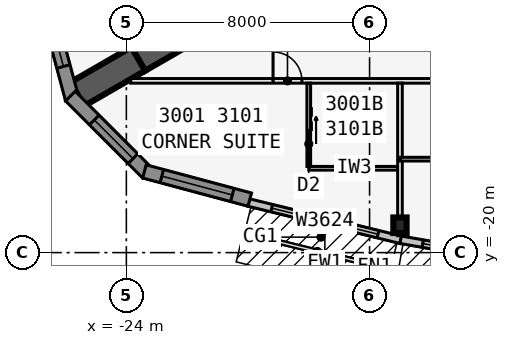
"""IFC4 building model, lengths in metres.
Left out: names, types, materials, properties, quantities, classifications, styles, units other than length and angle.
Written with IfcOpenShell. Run it as: python <this file> out.ifc"""

import sys

from ifc_helpers import new_model, si_unit, direction, frame, frame_2d, origin, origin_2d, place, context, subcontext, project, spatial, polyline, rectangle, i_section, outline, extrude, element, fill, save


model = new_model("IFC4")
c1 = context("Model", 3, precision=1e-05, world=origin(), true_north=direction((0.0, 1.0)))
c2 = subcontext(c1, "Body", "Model", "MODEL_VIEW")
j1 = project(units=[si_unit("LENGTHUNIT", "METRE"), si_unit("PLANEANGLEUNIT", "RADIAN")], contexts=[c1])
p1 = place(None, origin())
s1 = spatial("IfcSite", under=j1, at=p1, CompositionType="ELEMENT")
p2 = place(p1, origin())
s2 = spatial("IfcBuilding", under=s1, at=p2, CompositionType="ELEMENT")
p3 = place(p2, frame((0.0, 0.0, 118.1)))
s3 = spatial("IfcBuildingStorey", under=s2, at=p3, CompositionType="ELEMENT", Elevation=118.1)
for number, where, z_axis, x_axis in (
    (1, (-21.61, -12.477, 0.0), (0.0, 0.0, 1.0), (-0.866, -0.5, 0.0)),
    (2, (-23.61, -13.631, 0.0), (0.0, 0.0, 1.0), (-0.866, -0.5, 0.0)),
):
    element("IfcWall", number, at=place(p3, frame(where, z_axis=z_axis, x_axis=x_axis)), inside=s3, PredefinedType="SHEAR", context=c2, shape_type="SweptSolid", body=[
        extrude(rectangle(XDim=2.309, YDim=0.9, at=frame_2d((1.155, 0.0))), origin(), (0.0, 0.0, 1.0), 3.4),
    ])
p4 = place(p3, frame((-15.0, -19.1, 0.0), z_axis=(0.0, 0.0, 1.0), x_axis=(1.0, 0.0, 0.0)))
e3 = element("IfcColumn", 3, at=p4, inside=s3, PredefinedType="COLUMN", context=c2, shape_type="SweptSolid", body=[
    extrude(i_section(OverallWidth=0.437, OverallDepth=0.513, WebThickness=0.061, FlangeThickness=0.097, at=origin_2d()), origin(), (0.0, 0.0, 1.0), 3.4),
])
p5 = place(p3, frame((-19.97, -18.354, 0.0), z_axis=(0.0, 0.0, 1.0), x_axis=(0.971270024053, -0.237980126011, 0.0)))
e4 = element("IfcWall", 4, at=p5, inside=s3, PredefinedType="STANDARD", context=c2, shape_type="SweptSolid", body=[
    extrude(rectangle(XDim=5.148, YDim=0.25, at=frame_2d((2.574, 0.0))), origin(), (0.0, 0.0, 1.0), 3.235),
])
p6 = place(p5, frame((0.774, 0.0, 0.45)))
e5 = element("IfcOpeningElement", 5, at=p6, cuts=e4, PredefinedType="OPENING", context=c2, shape_type="SweptSolid", body=[
    extrude(rectangle(XDim=3.6, YDim=2.4, at=frame_2d((1.8, 1.2))), frame((0.0, 0.135, 0.0), z_axis=(0.0, -1.0, 0.0), x_axis=(1.0, 0.0, 0.0)), (0.0, 0.0, 1.0), 0.27),
])
p7 = place(p3, frame((-14.979, -19.577, 0.0), z_axis=(0.0, 0.0, 1.0), x_axis=(0.985030467156, -0.172380331752, 0.0)))
e6 = element("IfcWall", 6, at=p7, inside=s3, PredefinedType="STANDARD", context=c2, shape_type="SweptSolid", body=[
    extrude(rectangle(XDim=5.076, YDim=0.25, at=frame_2d((2.538, 0.0))), origin(), (0.0, 0.0, 1.0), 3.235),
])
p8 = place(p7, frame((0.738, 0.0, 0.45)))
e7 = element("IfcOpeningElement", 7, at=p8, cuts=e6, PredefinedType="OPENING", context=c2, shape_type="SweptSolid", body=[
    extrude(rectangle(XDim=3.6, YDim=2.4, at=frame_2d((1.8, 1.2))), frame((0.0, 0.135, 0.0), z_axis=(0.0, -1.0, 0.0), x_axis=(1.0, 0.0, 0.0)), (0.0, 0.0, 1.0), 0.27),
])
p9 = place(p3, frame((-26.711, -11.489, 0.0), z_axis=(0.0, 0.0, 1.0), x_axis=(0.258823421857, -0.965924653531, 0.0)))
e8 = element("IfcWall", 8, at=p9, inside=s3, PredefinedType="SOLIDWALL", context=c2, shape_type="SweptSolid", body=[
    extrude(outline(polyline([(3.586, 0.225), (3.527, 0.225), (3.035, 0.093), (3.0, 0.225), (0.0, 0.225), (0.0, -0.225), (3.586, -0.225), (3.586, 0.225)])), origin(), (0.0, 0.0, 1.0), 3.235),
])
p10 = place(p9, frame((0.675, 0.0, 0.45)))
e9 = element("IfcOpeningElement", 9, at=p10, cuts=e8, PredefinedType="OPENING", context=c2, shape_type="SweptSolid", body=[
    extrude(rectangle(XDim=1.8, YDim=2.4, at=frame_2d((0.9, 1.2))), frame((0.0, 0.235, 0.0), z_axis=(0.0, -1.0, 0.0), x_axis=(1.0, 0.0, 0.0)), (0.0, 0.0, 1.0), 0.47),
])
p11 = place(p3, frame((-25.841, -14.852, 0.0), z_axis=(0.0, 0.0, 1.0), x_axis=(0.707106781187, -0.707106781187, 0.0)))
e10 = element("IfcWall", 10, at=p11, inside=s3, PredefinedType="SOLIDWALL", context=c2, shape_type="SweptSolid", body=[
    extrude(outline(polyline([(3.586, 0.225), (0.586, 0.225), (0.551, 0.093), (0.059, 0.225), (0.0, 0.225), (0.0, -0.225), (3.586, -0.225), (3.586, 0.225)])), origin(), (0.0, 0.0, 1.0), 3.235),
])
p12 = place(p11, frame((1.111, 0.0, 0.45)))
e11 = element("IfcOpeningElement", 11, at=p12, cuts=e10, PredefinedType="OPENING", context=c2, shape_type="SweptSolid", body=[
    extrude(rectangle(XDim=1.8, YDim=2.4, at=frame_2d((0.9, 1.2))), frame((0.0, 0.235, 0.0), z_axis=(0.0, -1.0, 0.0), x_axis=(1.0, 0.0, 0.0)), (0.0, 0.0, 1.0), 0.47),
])
p13 = place(p3, frame((-23.406, -17.33, 0.0), z_axis=(0.0, 0.0, 1.0), x_axis=(0.965924653531, -0.258823421857, 0.0)))
e12 = element("IfcWall", 12, at=p13, inside=s3, PredefinedType="SOLIDWALL", context=c2, shape_type="SweptSolid", body=[
    extrude(rectangle(XDim=3.586, YDim=0.45, at=frame_2d((1.793, 0.0))), origin(), (0.0, 0.0, 1.0), 3.235),
])
p14 = place(p13, frame((0.593, 0.0, 0.45)))
e13 = element("IfcOpeningElement", 13, at=p14, cuts=e12, PredefinedType="OPENING", context=c2, shape_type="SweptSolid", body=[
    extrude(rectangle(XDim=2.4, YDim=2.4, at=frame_2d((1.2, 1.2))), frame((0.0, 0.235, 0.0), z_axis=(0.0, -1.0, 0.0), x_axis=(1.0, 0.0, 0.0)), (0.0, 0.0, 1.0), 0.47),
])
p15 = place(p3, frame((-23.857, -14.351, 0.0), z_axis=(0.0, 0.0, 1.0), x_axis=(1.0, 0.0, 0.0)))
e14 = element("IfcWall", 14, at=p15, inside=s3, PredefinedType="PARTITIONING", context=c2, shape_type="SweptSolid", body=[
    extrude(rectangle(XDim=47.714, YDim=0.15, at=frame_2d((23.857, 0.0))), origin(), (0.0, 0.0, 1.0), 3.235),
])
p16 = place(p15, frame((4.682, 0.0, 0.0)))
e15 = element("IfcOpeningElement", 15, at=p16, cuts=e14, PredefinedType="OPENING", context=c2, shape_type="SweptSolid", body=[
    extrude(rectangle(XDim=0.95, YDim=2.13, at=frame_2d((0.475, 1.065))), frame((0.0, 0.085, 0.0), z_axis=(0.0, -1.0, 0.0), x_axis=(1.0, 0.0, 0.0)), (0.0, 0.0, 1.0), 0.17),
])
p17 = place(p15, frame((11.482, 0.0, 0.0)))
e16 = element("IfcOpeningElement", 16, at=p17, cuts=e14, PredefinedType="OPENING", context=c2, shape_type="SweptSolid", body=[
    extrude(rectangle(XDim=0.95, YDim=2.13, at=frame_2d((0.475, 1.065))), frame((0.0, 0.085, 0.0), z_axis=(0.0, -1.0, 0.0), x_axis=(1.0, 0.0, 0.0)), (0.0, 0.0, 1.0), 0.17),
])
p18 = place(p15, frame((16.482, 0.0, 0.0)))
e17 = element("IfcOpeningElement", 17, at=p18, cuts=e14, PredefinedType="OPENING", context=c2, shape_type="SweptSolid", body=[
    extrude(rectangle(XDim=0.95, YDim=2.13, at=frame_2d((0.475, 1.065))), frame((0.0, 0.085, 0.0), z_axis=(0.0, -1.0, 0.0), x_axis=(1.0, 0.0, 0.0)), (0.0, 0.0, 1.0), 0.17),
])
p19 = place(p15, frame((21.482, 0.0, 0.0)))
e18 = element("IfcOpeningElement", 18, at=p19, cuts=e14, PredefinedType="OPENING", context=c2, shape_type="SweptSolid", body=[
    extrude(rectangle(XDim=0.95, YDim=2.13, at=frame_2d((0.475, 1.065))), frame((0.0, 0.085, 0.0), z_axis=(0.0, -1.0, 0.0), x_axis=(1.0, 0.0, 0.0)), (0.0, 0.0, 1.0), 0.17),
])
p20 = place(p15, frame((25.857, 0.0, 0.0)))
e19 = element("IfcOpeningElement", 19, at=p20, cuts=e14, PredefinedType="OPENING", context=c2, shape_type="SweptSolid", body=[
    extrude(rectangle(XDim=1.0, YDim=2.13, at=frame_2d((0.5, 1.065))), frame((0.0, 0.085, 0.0), z_axis=(0.0, -1.0, 0.0), x_axis=(1.0, 0.0, 0.0)), (0.0, 0.0, 1.0), 0.17),
])
p21 = place(p15, frame((32.082, 0.0, 0.0)))
e20 = element("IfcOpeningElement", 20, at=p21, cuts=e14, PredefinedType="OPENING", context=c2, shape_type="SweptSolid", body=[
    extrude(rectangle(XDim=0.95, YDim=2.13, at=frame_2d((0.475, 1.065))), frame((0.0, 0.085, 0.0), z_axis=(0.0, -1.0, 0.0), x_axis=(1.0, 0.0, 0.0)), (0.0, 0.0, 1.0), 0.17),
])
p22 = place(p15, frame((42.082, 0.0, 0.0)))
e21 = element("IfcOpeningElement", 21, at=p22, cuts=e14, PredefinedType="OPENING", context=c2, shape_type="SweptSolid", body=[
    extrude(rectangle(XDim=0.95, YDim=2.13, at=frame_2d((0.475, 1.065))), frame((0.0, 0.085, 0.0), z_axis=(0.0, -1.0, 0.0), x_axis=(1.0, 0.0, 0.0)), (0.0, 0.0, 1.0), 0.17),
])
p23 = place(p3, frame((-15.0, -14.426, 0.0), z_axis=(0.0, 0.0, 1.0), x_axis=(0.0, -1.0, 0.0)))
e22 = element("IfcWall", 22, at=p23, inside=s3, PredefinedType="PARTITIONING", context=c2, shape_type="SweptSolid", body=[
    extrude(rectangle(XDim=5.017, YDim=0.15, at=frame_2d((2.508, 0.0))), origin(), (0.0, 0.0, 1.0), 2.389),
])
p24 = place(p3, frame((-18.0, -17.226, 0.0), z_axis=(0.0, 0.0, 1.0), x_axis=(1.0, 0.0, 0.0)))
e23 = element("IfcWall", 23, at=p24, inside=s3, PredefinedType="PLUMBINGWALL", context=c2, shape_type="SweptSolid", body=[
    extrude(rectangle(XDim=3.0, YDim=0.12, at=frame_2d((1.5, 0.0))), origin(), (0.0, 0.0, 1.0), 3.235),
])
p25 = place(p3, frame((-18.0, -14.426, 0.0), z_axis=(0.0, 0.0, 1.0), x_axis=(0.0, -1.0, 0.0)))
e24 = element("IfcWall", 24, at=p25, inside=s3, PredefinedType="PLUMBINGWALL", context=c2, shape_type="SweptSolid", body=[
    extrude(rectangle(XDim=2.74, YDim=0.12, at=frame_2d((1.37, 0.0))), origin(), (0.0, 0.0, 1.0), 3.235),
])
p26 = place(p25, frame((1.55, 0.0, 0.0)))
e25 = element("IfcOpeningElement", 25, at=p26, cuts=e24, PredefinedType="OPENING", context=c2, shape_type="SweptSolid", body=[
    extrude(rectangle(XDim=0.9, YDim=2.13, at=frame_2d((0.45, 1.065))), frame((0.0, 0.07, 0.0), z_axis=(0.0, -1.0, 0.0), x_axis=(1.0, 0.0, 0.0)), (0.0, 0.0, 1.0), 0.14),
])
p27 = place(p3, frame((-15.0, -16.926, 0.0), z_axis=(0.0, 0.0, 1.0), x_axis=(1.0, 0.0, 0.0)))
e26 = element("IfcWall", 26, at=p27, inside=s3, PredefinedType="PLUMBINGWALL", context=c2, shape_type="SweptSolid", body=[
    extrude(rectangle(XDim=2.4, YDim=0.12, at=frame_2d((1.2, 0.0))), origin(), (0.0, 0.0, 1.0), 3.235),
])
p28 = place(p6, origin())
e27 = element("IfcWindow", 27, at=p28, inside=s3, PartitioningType="SINGLE_PANEL", PredefinedType="WINDOW", context=c2, shape_type="SweptSolid", body=[
    extrude(rectangle(XDim=3.6, YDim=2.4, at=frame_2d((1.8, 1.2))), frame((0.0, 0.03, 0.0), z_axis=(0.0, -1.0, 0.0), x_axis=(1.0, 0.0, 0.0)), (0.0, 0.0, 1.0), 0.06),
])
fill(e5, e27)
p29 = place(p8, origin())
e28 = element("IfcWindow", 28, at=p29, inside=s3, PartitioningType="SINGLE_PANEL", PredefinedType="WINDOW", context=c2, shape_type="SweptSolid", body=[
    extrude(rectangle(XDim=3.6, YDim=2.4, at=frame_2d((1.8, 1.2))), frame((0.0, 0.03, 0.0), z_axis=(0.0, -1.0, 0.0), x_axis=(1.0, 0.0, 0.0)), (0.0, 0.0, 1.0), 0.06),
])
fill(e7, e28)
p30 = place(p10, origin())
e29 = element("IfcWindow", 29, at=p30, inside=s3, PartitioningType="SINGLE_PANEL", PredefinedType="WINDOW", context=c2, shape_type="SweptSolid", body=[
    extrude(rectangle(XDim=1.8, YDim=2.4, at=frame_2d((0.9, 1.2))), frame((0.0, 0.03, 0.0), z_axis=(0.0, -1.0, 0.0), x_axis=(1.0, 0.0, 0.0)), (0.0, 0.0, 1.0), 0.06),
])
fill(e9, e29)
p31 = place(p12, origin())
e30 = element("IfcWindow", 30, at=p31, inside=s3, PartitioningType="SINGLE_PANEL", PredefinedType="WINDOW", context=c2, shape_type="SweptSolid", body=[
    extrude(rectangle(XDim=1.8, YDim=2.4, at=frame_2d((0.9, 1.2))), frame((0.0, 0.03, 0.0), z_axis=(0.0, -1.0, 0.0), x_axis=(1.0, 0.0, 0.0)), (0.0, 0.0, 1.0), 0.06),
])
fill(e11, e30)
p32 = place(p14, origin())
e31 = element("IfcWindow", 31, at=p32, inside=s3, PartitioningType="SINGLE_PANEL", PredefinedType="WINDOW", context=c2, shape_type="SweptSolid", body=[
    extrude(rectangle(XDim=2.4, YDim=2.4, at=frame_2d((1.2, 1.2))), frame((0.0, 0.03, 0.0), z_axis=(0.0, -1.0, 0.0), x_axis=(1.0, 0.0, 0.0)), (0.0, 0.0, 1.0), 0.06),
])
fill(e13, e31)
p33 = place(p26, origin())
e32 = element("IfcDoor", 32, at=p33, inside=s3, OperationType="SLIDING_TO_LEFT", PredefinedType="DOOR", context=c2, shape_type="SweptSolid", body=[
    extrude(rectangle(XDim=0.9, YDim=2.13, at=frame_2d((0.45, 1.065))), frame((0.0, 0.025, 0.0), z_axis=(0.0, -1.0, 0.0), x_axis=(1.0, 0.0, 0.0)), (0.0, 0.0, 1.0), 0.05),
])
fill(e25, e32)
p34 = place(p16, origin())
e33 = element("IfcDoor", 33, at=p34, inside=s3, OperationType="SINGLE_SWING_LEFT", PredefinedType="DOOR", context=c2, shape_type="SweptSolid", body=[
    extrude(rectangle(XDim=0.95, YDim=2.13, at=frame_2d((0.475, 1.065))), frame((0.0, 0.025, 0.0), z_axis=(0.0, -1.0, 0.0), x_axis=(1.0, 0.0, 0.0)), (0.0, 0.0, 1.0), 0.05),
])
fill(e15, e33)
save(model, sys.argv[1])
